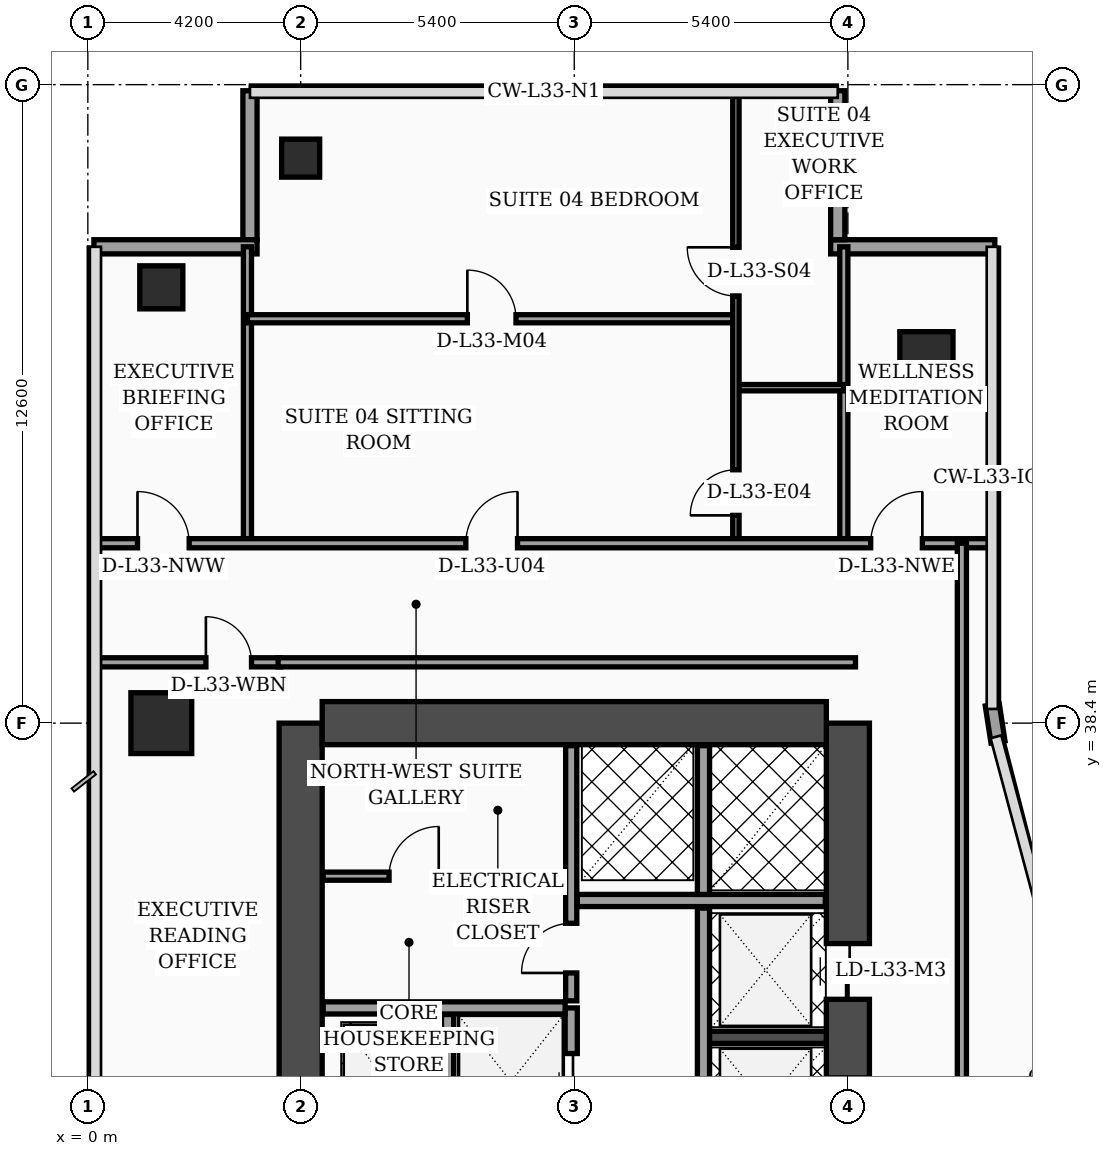
"""IFC4 building model, lengths in metres.
Left out: names, types, materials, properties, quantities, classifications, styles, units other than length and angle.
Written with IfcOpenShell. Run it as: python <this file> out.ifc"""

import sys

from ifc_helpers import new_model, si_unit, direction, frame, frame_2d, origin, origin_2d, place, context, subcontext, project, spatial, rectangle, hollow_rectangle, extrude, element, fill, save


model = new_model("IFC4")
c1 = context("Model", 3, precision=1e-05, world=origin(), true_north=direction((0.0, 1.0)))
c2 = subcontext(c1, "Body", "Model", "MODEL_VIEW")
j1 = project(units=[si_unit("LENGTHUNIT", "METRE"), si_unit("PLANEANGLEUNIT", "RADIAN")], contexts=[c1])
p1 = place(None, origin())
s1 = spatial("IfcSite", under=j1, at=p1, CompositionType="ELEMENT")
p2 = place(p1, origin())
s2 = spatial("IfcBuilding", under=s1, at=p2, CompositionType="ELEMENT")
p3 = place(p2, frame((0.0, 0.0, 135.4)))
s3 = spatial("IfcBuildingStorey", under=s2, at=p3, CompositionType="ELEMENT", Elevation=135.4)
p4 = place(p3, frame((4.2, 16.8, 0.0), z_axis=(0.0, 0.0, 1.0), x_axis=(0.0, 1.0, 0.0)))
e1 = element("IfcWall", 1, at=p4, inside=s3, PredefinedType="SHEAR", context=c2, shape_type="SweptSolid", body=[
    extrude(rectangle(XDim=21.6, YDim=0.85, at=frame_2d((10.8, 0.0))), origin(), (0.0, 0.0, 1.0), 3.52),
])
p5 = place(p3, frame((15.0, 16.8, 0.0), z_axis=(0.0, 0.0, 1.0), x_axis=(0.0, 1.0, 0.0)))
e2 = element("IfcWall", 2, at=p5, inside=s3, PredefinedType="SHEAR", context=c2, shape_type="SweptSolid", body=[
    extrude(rectangle(XDim=21.6, YDim=0.85, at=frame_2d((10.8, 0.0))), origin(), (0.0, 0.0, 1.0), 3.52),
])
p6 = place(p5, frame((8.65, 0.0, 0.0)))
e3 = element("IfcOpeningElement", 3, at=p6, cuts=e2, PredefinedType="OPENING", context=c2, shape_type="SweptSolid", body=[
    extrude(rectangle(XDim=1.1, YDim=2.2, at=frame_2d((0.55, 1.1))), frame((0.0, 0.435, 0.0), z_axis=(0.0, -1.0, 0.0), x_axis=(1.0, 0.0, 0.0)), (0.0, 0.0, 1.0), 0.87),
])
p7 = place(p5, frame((10.85, 0.0, 0.0)))
e4 = element("IfcOpeningElement", 4, at=p7, cuts=e2, PredefinedType="OPENING", context=c2, shape_type="SweptSolid", body=[
    extrude(rectangle(XDim=1.1, YDim=2.2, at=frame_2d((0.55, 1.1))), frame((0.0, 0.435, 0.0), z_axis=(0.0, -1.0, 0.0), x_axis=(1.0, 0.0, 0.0)), (0.0, 0.0, 1.0), 0.87),
])
p8 = place(p5, frame((13.5, 0.0, 0.0)))
e5 = element("IfcOpeningElement", 5, at=p8, cuts=e2, PredefinedType="OPENING", context=c2, shape_type="SweptSolid", body=[
    extrude(rectangle(XDim=1.1, YDim=2.2, at=frame_2d((0.55, 1.1))), frame((0.0, 0.435, 0.0), z_axis=(0.0, -1.0, 0.0), x_axis=(1.0, 0.0, 0.0)), (0.0, 0.0, 1.0), 0.87),
])
p9 = place(p5, frame((16.15, 0.0, 0.0)))
e6 = element("IfcOpeningElement", 6, at=p9, cuts=e2, PredefinedType="OPENING", context=c2, shape_type="SweptSolid", body=[
    extrude(rectangle(XDim=1.1, YDim=2.2, at=frame_2d((0.55, 1.1))), frame((0.0, 0.435, 0.0), z_axis=(0.0, -1.0, 0.0), x_axis=(1.0, 0.0, 0.0)), (0.0, 0.0, 1.0), 0.87),
])
p10 = place(p3, frame((4.625, 38.4, 0.0), z_axis=(0.0, 0.0, 1.0), x_axis=(1.0, 0.0, 0.0)))
e7 = element("IfcWall", 7, at=p10, inside=s3, PredefinedType="SHEAR", context=c2, shape_type="SweptSolid", body=[
    extrude(rectangle(XDim=9.95, YDim=0.85, at=frame_2d((4.975, 0.0))), origin(), (0.0, 0.0, 1.0), 3.52),
])
p11 = place(p3, frame((12.18, 32.2, 0.0), z_axis=(0.0, 0.0, 1.0), x_axis=(1.0, 0.0, 0.0)))
e8 = element("IfcWall", 8, at=p11, inside=s3, PredefinedType="SOLIDWALL", context=c2, shape_type="SweptSolid", body=[
    extrude(rectangle(XDim=2.395, YDim=0.24, at=frame_2d((1.198, 0.0))), origin(), (0.0, 0.0, 1.0), 3.52),
])
p12 = place(p3, frame((1.45, 38.4, 0.0), z_axis=(0.0, 0.0, 1.0), x_axis=(1.0, 0.0, 0.0)))
e9 = element("IfcColumn", 9, at=p12, inside=s3, PredefinedType="COLUMN", context=c2, shape_type="SweptSolid", body=[
    extrude(rectangle(XDim=1.2, YDim=1.2, at=origin_2d()), origin(), (0.0, 0.0, 1.0), 3.52),
])
p13 = place(p3, frame((1.45, 47.0, 0.0), z_axis=(0.0, 0.0, 1.0), x_axis=(1.0, 0.0, 0.0)))
e10 = element("IfcColumn", 10, at=p13, inside=s3, PredefinedType="COLUMN", context=c2, shape_type="SweptSolid", body=[
    extrude(hollow_rectangle(XDim=0.85, YDim=0.85, WallThickness=0.036, at=origin_2d()), origin(), (0.0, 0.0, 1.0), 3.52),
])
p14 = place(p3, frame((4.2, 49.55, 0.0), z_axis=(0.0, 0.0, 1.0), x_axis=(1.0, 0.0, 0.0)))
e11 = element("IfcColumn", 11, at=p14, inside=s3, PredefinedType="COLUMN", context=c2, shape_type="SweptSolid", body=[
    extrude(hollow_rectangle(XDim=0.75, YDim=0.75, WallThickness=0.032, at=origin_2d()), origin(), (0.0, 0.0, 1.0), 3.52),
])
p15 = place(p3, frame((16.55, 45.6, 0.0), z_axis=(0.0, 0.0, 1.0), x_axis=(1.0, 0.0, 0.0)))
e12 = element("IfcColumn", 12, at=p15, inside=s3, PredefinedType="COLUMN", context=c2, shape_type="SweptSolid", body=[
    extrude(rectangle(XDim=1.05, YDim=1.05, at=origin_2d()), origin(), (0.0, 0.0, 1.0), 3.52),
])
p16 = place(p3, frame((17.962, 38.03, 0.0), z_axis=(0.0, 0.0, 1.0), x_axis=(-0.15141125477, 0.988470855377, 0.0)))
e13 = element("IfcWall", 13, at=p16, inside=s3, PredefinedType="SOLIDWALL", context=c2, shape_type="SweptSolid", body=[
    extrude(rectangle(XDim=0.739, YDim=0.28, at=frame_2d((0.369, 0.0))), origin(), (0.0, 0.0, 1.0), 3.52),
])
p17 = place(p3, frame((17.9, 47.8, 0.0), z_axis=(0.0, 0.0, 1.0), x_axis=(-1.0, 0.0, 0.0)))
e14 = element("IfcWall", 14, at=p17, inside=s3, PredefinedType="SOLIDWALL", context=c2, shape_type="SweptSolid", body=[
    extrude(rectangle(XDim=3.24, YDim=0.28, at=frame_2d((1.62, 0.0))), origin(), (0.0, 0.0, 1.0), 3.52),
])
p18 = place(p3, frame((14.8, 47.94, 0.0), z_axis=(0.0, 0.0, 1.0), x_axis=(0.0, 1.0, 0.0)))
e15 = element("IfcWall", 15, at=p18, inside=s3, PredefinedType="SOLIDWALL", context=c2, shape_type="SweptSolid", body=[
    extrude(rectangle(XDim=2.94, YDim=0.28, at=frame_2d((1.47, 0.0))), origin(), (0.0, 0.0, 1.0), 3.52),
])
p19 = place(p3, frame((3.2, 50.88, 0.0), z_axis=(0.0, 0.0, 1.0), x_axis=(0.0, -1.0, 0.0)))
e16 = element("IfcWall", 16, at=p19, inside=s3, PredefinedType="SOLIDWALL", context=c2, shape_type="SweptSolid", body=[
    extrude(rectangle(XDim=2.94, YDim=0.28, at=frame_2d((1.47, 0.0))), origin(), (0.0, 0.0, 1.0), 3.02),
])
p20 = place(p3, frame((3.34, 47.8, 0.0), z_axis=(0.0, 0.0, 1.0), x_axis=(-1.0, 0.0, 0.0)))
e17 = element("IfcWall", 17, at=p20, inside=s3, PredefinedType="SOLIDWALL", context=c2, shape_type="SweptSolid", body=[
    extrude(rectangle(XDim=3.22, YDim=0.28, at=frame_2d((1.61, 0.0))), origin(), (0.0, 0.0, 1.0), 3.02),
])
p21 = place(p3, frame((7.1, 30.02, 0.0), z_axis=(0.0, 0.0, 1.0), x_axis=(0.0, 1.0, 0.0)))
e18 = element("IfcWall", 18, at=p21, inside=s3, PredefinedType="SOLIDWALL", context=c2, shape_type="SweptSolid", body=[
    extrude(rectangle(XDim=2.63, YDim=0.24, at=frame_2d((1.315, 0.0))), origin(), (0.0, 0.0, 1.0), 3.52),
])
p22 = place(p3, frame((9.54, 29.88, 0.0), z_axis=(0.0, 0.0, 1.0), x_axis=(0.0, 1.0, 0.0)))
e19 = element("IfcWall", 19, at=p22, inside=s3, PredefinedType="SOLIDWALL", context=c2, shape_type="SweptSolid", body=[
    extrude(rectangle(XDim=2.9, YDim=0.24, at=frame_2d((1.45, 0.0))), origin(), (0.0, 0.0, 1.0), 3.52),
])
p23 = place(p22, frame((0.7, 0.0, 0.0)))
e20 = element("IfcOpeningElement", 20, at=p23, cuts=e19, PredefinedType="OPENING", context=c2, shape_type="SweptSolid", body=[
    extrude(rectangle(XDim=1.3, YDim=2.35, at=frame_2d((0.65, 1.175))), frame((0.0, 0.13, 0.0), z_axis=(0.0, -1.0, 0.0), x_axis=(1.0, 0.0, 0.0)), (0.0, 0.0, 1.0), 0.26),
])
p24 = place(p3, frame((4.645, 32.78, 0.0), z_axis=(0.0, 0.0, 1.0), x_axis=(1.0, 0.0, 0.0)))
e21 = element("IfcWall", 21, at=p24, inside=s3, PredefinedType="SOLIDWALL", context=c2, shape_type="SweptSolid", body=[
    extrude(rectangle(XDim=4.775, YDim=0.24, at=frame_2d((2.387, 0.0))), origin(), (0.0, 0.0, 1.0), 3.17),
])
p25 = place(p3, frame((4.645, 35.38, 0.0), z_axis=(0.0, 0.0, 1.0), x_axis=(1.0, 0.0, 0.0)))
e22 = element("IfcWall", 22, at=p25, inside=s3, PredefinedType="PARTITIONING", context=c2, shape_type="SweptSolid", body=[
    extrude(rectangle(XDim=4.775, YDim=0.16, at=frame_2d((2.387, 0.0))), origin(), (0.0, 0.0, 1.0), 3.52),
])
p26 = place(p25, frame((1.3, 0.0, 0.0)))
e23 = element("IfcOpeningElement", 23, at=p26, cuts=e22, PredefinedType="OPENING", context=c2, shape_type="SweptSolid", body=[
    extrude(rectangle(XDim=0.98, YDim=2.15, at=frame_2d((0.49, 1.075))), frame((0.0, 0.09, 0.0), z_axis=(0.0, -1.0, 0.0), x_axis=(1.0, 0.0, 0.0)), (0.0, 0.0, 1.0), 0.18),
])
p27 = place(p3, frame((9.54, 32.92, 0.0), z_axis=(0.0, 0.0, 1.0), x_axis=(0.0, 1.0, 0.0)))
e24 = element("IfcWall", 24, at=p27, inside=s3, PredefinedType="SOLIDWALL", context=c2, shape_type="SweptSolid", body=[
    extrude(rectangle(XDim=5.035, YDim=0.22, at=frame_2d((2.518, 0.0))), origin(), (0.0, 0.0, 1.0), 3.52),
])
p28 = place(p27, frame((0.55, 0.0, 0.0)))
e25 = element("IfcOpeningElement", 25, at=p28, cuts=e24, PredefinedType="OPENING", context=c2, shape_type="SweptSolid", body=[
    extrude(rectangle(XDim=0.98, YDim=2.15, at=frame_2d((0.49, 1.075))), frame((0.0, 0.12, 0.0), z_axis=(0.0, -1.0, 0.0), x_axis=(1.0, 0.0, 0.0)), (0.0, 0.0, 1.0), 0.24),
])
p29 = place(p3, frame((12.15, 27.0, 0.0), z_axis=(0.0, 0.0, 1.0), x_axis=(0.0, 1.0, 0.0)))
e26 = element("IfcWall", 26, at=p29, inside=s3, PredefinedType="SOLIDWALL", context=c2, shape_type="SweptSolid", body=[
    extrude(rectangle(XDim=7.75, YDim=0.24, at=frame_2d((3.875, 0.0))), origin(), (0.0, 0.0, 1.0), 3.52),
])
p30 = place(p3, frame((9.66, 34.9, 0.0), z_axis=(0.0, 0.0, 1.0), x_axis=(1.0, 0.0, 0.0)))
e27 = element("IfcWall", 27, at=p30, inside=s3, PredefinedType="SOLIDWALL", context=c2, shape_type="SweptSolid", body=[
    extrude(rectangle(XDim=4.895, YDim=0.24, at=frame_2d((2.448, 0.0))), origin(), (0.0, 0.0, 1.0), 3.52),
])
p31 = place(p3, frame((12.15, 35.02, 0.0), z_axis=(0.0, 0.0, 1.0), x_axis=(0.0, 1.0, 0.0)))
e28 = element("IfcWall", 28, at=p31, inside=s3, PredefinedType="SOLIDWALL", context=c2, shape_type="SweptSolid", body=[
    extrude(rectangle(XDim=2.935, YDim=0.24, at=frame_2d((1.468, 0.0))), origin(), (0.0, 0.0, 1.0), 3.52),
])
p32 = place(p3, frame((0.08, 39.6, 0.0), z_axis=(0.0, 0.0, 1.0), x_axis=(1.0, 0.0, 0.0)))
e29 = element("IfcWall", 29, at=p32, inside=s3, PredefinedType="PARTITIONING", context=c2, shape_type="SweptSolid", body=[
    extrude(rectangle(XDim=3.725, YDim=0.18, at=frame_2d((1.862, 0.0))), origin(), (0.0, 0.0, 1.0), 2.82),
])
p33 = place(p32, frame((2.25, 0.0, 0.0)))
e30 = element("IfcOpeningElement", 30, at=p33, cuts=e29, PredefinedType="OPENING", context=c2, shape_type="SweptSolid", body=[
    extrude(rectangle(XDim=0.9, YDim=2.15, at=frame_2d((0.45, 1.075))), frame((0.0, 0.1, 0.0), z_axis=(0.0, -1.0, 0.0), x_axis=(1.0, 0.0, 0.0)), (0.0, 0.0, 1.0), 0.2),
])
p34 = place(p3, frame((3.15, 41.95, 0.0), z_axis=(0.0, 0.0, 1.0), x_axis=(0.0, 1.0, 0.0)))
e31 = element("IfcWall", 31, at=p34, inside=s3, PredefinedType="PARTITIONING", context=c2, shape_type="SweptSolid", body=[
    extrude(rectangle(XDim=5.85, YDim=0.16, at=frame_2d((2.925, 0.0))), origin(), (0.0, 0.0, 1.0), 3.12),
])
p35 = place(p3, frame((14.92, 41.95, 0.0), z_axis=(0.0, 0.0, 1.0), x_axis=(0.0, 1.0, 0.0)))
e32 = element("IfcWall", 32, at=p35, inside=s3, PredefinedType="PARTITIONING", context=c2, shape_type="SweptSolid", body=[
    extrude(rectangle(XDim=5.85, YDim=0.16, at=frame_2d((2.925, 0.0))), origin(), (0.0, 0.0, 1.0), 3.02),
])
p36 = place(p3, frame((12.79, 45.02, 0.0), z_axis=(0.0, 0.0, 1.0), x_axis=(1.0, 0.0, 0.0)))
e33 = element("IfcWall", 33, at=p36, inside=s3, PredefinedType="PARTITIONING", context=c2, shape_type="SweptSolid", body=[
    extrude(rectangle(XDim=2.13, YDim=0.125, at=frame_2d((1.065, 0.0))), origin(), (0.0, 0.0, 1.0), 3.52),
])
p37 = place(p3, frame((3.15, 46.38, 0.0), z_axis=(0.0, 0.0, 1.0), x_axis=(1.0, 0.0, 0.0)))
e34 = element("IfcWall", 34, at=p37, inside=s3, PredefinedType="PARTITIONING", context=c2, shape_type="SweptSolid", body=[
    extrude(rectangle(XDim=9.64, YDim=0.16, at=frame_2d((4.82, 0.0))), origin(), (0.0, 0.0, 1.0), 2.82),
])
p38 = place(p37, frame((4.34, 0.0, 0.0)))
e35 = element("IfcOpeningElement", 35, at=p38, cuts=e34, PredefinedType="OPENING", context=c2, shape_type="SweptSolid", body=[
    extrude(rectangle(XDim=0.96, YDim=2.2, at=frame_2d((0.48, 1.1))), frame((0.0, 0.09, 0.0), z_axis=(0.0, -1.0, 0.0), x_axis=(1.0, 0.0, 0.0)), (0.0, 0.0, 1.0), 0.18),
])
p39 = place(p3, frame((12.79, 41.95, 0.0), z_axis=(0.0, 0.0, 1.0), x_axis=(0.0, 1.0, 0.0)))
e36 = element("IfcWall", 36, at=p39, inside=s3, PredefinedType="PARTITIONING", context=c2, shape_type="SweptSolid", body=[
    extrude(rectangle(XDim=8.99, YDim=0.125, at=frame_2d((4.495, 0.0))), origin(), (0.0, 0.0, 1.0), 3.02),
])
p40 = place(p39, frame((0.55, 0.0, 0.0)))
e37 = element("IfcOpeningElement", 37, at=p40, cuts=e36, PredefinedType="OPENING", context=c2, shape_type="SweptSolid", body=[
    extrude(rectangle(XDim=0.9, YDim=2.15, at=frame_2d((0.45, 1.075))), frame((0.0, 0.073, 0.0), z_axis=(0.0, -1.0, 0.0), x_axis=(1.0, 0.0, 0.0)), (0.0, 0.0, 1.0), 0.145),
])
p41 = place(p39, frame((4.88, 0.0, 0.0)))
e38 = element("IfcOpeningElement", 38, at=p41, cuts=e36, PredefinedType="OPENING", context=c2, shape_type="SweptSolid", body=[
    extrude(rectangle(XDim=0.96, YDim=2.2, at=frame_2d((0.48, 1.1))), frame((0.0, 0.073, 0.0), z_axis=(0.0, -1.0, 0.0), x_axis=(1.0, 0.0, 0.0)), (0.0, 0.0, 1.0), 0.145),
])
p42 = place(p3, frame((0.08, 41.95, 0.0), z_axis=(0.0, 0.0, 1.0), x_axis=(1.0, 0.0, 0.0)))
e39 = element("IfcWall", 39, at=p42, inside=s3, PredefinedType="PARTITIONING", context=c2, shape_type="SweptSolid", body=[
    extrude(rectangle(XDim=17.77, YDim=0.18, at=frame_2d((8.885, 0.0))), origin(), (0.0, 0.0, 1.0), 2.82),
])
p43 = place(p42, frame((0.9, 0.0, 0.0)))
e40 = element("IfcOpeningElement", 40, at=p43, cuts=e39, PredefinedType="OPENING", context=c2, shape_type="SweptSolid", body=[
    extrude(rectangle(XDim=1.02, YDim=2.2, at=frame_2d((0.51, 1.1))), frame((0.0, 0.1, 0.0), z_axis=(0.0, -1.0, 0.0), x_axis=(1.0, 0.0, 0.0)), (0.0, 0.0, 1.0), 0.2),
])
p44 = place(p42, frame((7.38, 0.0, 0.0)))
e41 = element("IfcOpeningElement", 41, at=p44, cuts=e39, PredefinedType="OPENING", context=c2, shape_type="SweptSolid", body=[
    extrude(rectangle(XDim=1.02, YDim=2.2, at=frame_2d((0.51, 1.1))), frame((0.0, 0.1, 0.0), z_axis=(0.0, -1.0, 0.0), x_axis=(1.0, 0.0, 0.0)), (0.0, 0.0, 1.0), 0.2),
])
p45 = place(p42, frame((15.37, 0.0, 0.0)))
e42 = element("IfcOpeningElement", 42, at=p45, cuts=e39, PredefinedType="OPENING", context=c2, shape_type="SweptSolid", body=[
    extrude(rectangle(XDim=1.02, YDim=2.2, at=frame_2d((0.51, 1.1))), frame((0.0, 0.1, 0.0), z_axis=(0.0, -1.0, 0.0), x_axis=(1.0, 0.0, 0.0)), (0.0, 0.0, 1.0), 0.2),
])
p46 = place(p3, frame((17.25, 24.3, 0.0), z_axis=(0.0, 0.0, 1.0), x_axis=(0.0, 1.0, 0.0)))
e43 = element("IfcWall", 43, at=p46, inside=s3, PredefinedType="PARTITIONING", context=c2, shape_type="SweptSolid", body=[
    extrude(rectangle(XDim=17.65, YDim=0.18, at=frame_2d((8.825, 0.0))), origin(), (0.0, 0.0, 1.0), 2.82),
])
p47 = place(p3, frame((3.755, 39.6, 0.0), z_axis=(0.0, 0.0, 1.0), x_axis=(1.0, 0.0, 0.0)))
e44 = element("IfcWall", 44, at=p47, inside=s3, PredefinedType="PARTITIONING", context=c2, shape_type="SweptSolid", body=[
    extrude(rectangle(XDim=11.395, YDim=0.18, at=frame_2d((5.698, 0.0))), origin(), (0.0, 0.0, 1.0), 2.82),
])
p48 = place(p23, origin())
e45 = element("IfcDoor", 45, at=p48, inside=s3, OperationType="DOUBLE_DOOR_SLIDING", PredefinedType="DOOR", context=c2, shape_type="SweptSolid", body=[
    extrude(rectangle(XDim=1.3, YDim=2.35, at=frame_2d((0.65, 1.175))), frame((0.0, 0.025, 0.0), z_axis=(0.0, -1.0, 0.0), x_axis=(1.0, 0.0, 0.0)), (0.0, 0.0, 1.0), 0.05),
])
fill(e20, e45)
p49 = place(p26, origin())
e46 = element("IfcDoor", 46, at=p49, inside=s3, OperationType="SINGLE_SWING_RIGHT", PredefinedType="DOOR", context=c2, shape_type="SweptSolid", body=[
    extrude(rectangle(XDim=0.98, YDim=2.15, at=frame_2d((0.49, 1.075))), frame((0.0, 0.025, 0.0), z_axis=(0.0, -1.0, 0.0), x_axis=(1.0, 0.0, 0.0)), (0.0, 0.0, 1.0), 0.05),
])
fill(e23, e46)
p50 = place(p28, origin())
e47 = element("IfcDoor", 47, at=p50, inside=s3, OperationType="SINGLE_SWING_LEFT", PredefinedType="DOOR", context=c2, shape_type="SweptSolid", body=[
    extrude(rectangle(XDim=0.98, YDim=2.15, at=frame_2d((0.49, 1.075))), frame((0.0, 0.025, 0.0), z_axis=(0.0, -1.0, 0.0), x_axis=(1.0, 0.0, 0.0)), (0.0, 0.0, 1.0), 0.05),
])
fill(e25, e47)
p51 = place(p33, origin())
e48 = element("IfcDoor", 48, at=p51, inside=s3, OperationType="SINGLE_SWING_LEFT", PredefinedType="DOOR", context=c2, shape_type="SweptSolid", body=[
    extrude(rectangle(XDim=0.9, YDim=2.15, at=frame_2d((0.45, 1.075))), frame((0.0, 0.025, 0.0), z_axis=(0.0, -1.0, 0.0), x_axis=(1.0, 0.0, 0.0)), (0.0, 0.0, 1.0), 0.05),
])
fill(e30, e48)
p52 = place(p38, origin())
e49 = element("IfcDoor", 49, at=p52, inside=s3, OperationType="SINGLE_SWING_LEFT", PredefinedType="DOOR", context=c2, shape_type="SweptSolid", body=[
    extrude(rectangle(XDim=0.96, YDim=2.2, at=frame_2d((0.48, 1.1))), frame((0.0, 0.025, 0.0), z_axis=(0.0, -1.0, 0.0), x_axis=(1.0, 0.0, 0.0)), (0.0, 0.0, 1.0), 0.05),
])
fill(e35, e49)
p53 = place(p40, origin())
e50 = element("IfcDoor", 50, at=p53, inside=s3, OperationType="SINGLE_SWING_LEFT", PredefinedType="DOOR", context=c2, shape_type="SweptSolid", body=[
    extrude(rectangle(XDim=0.9, YDim=2.15, at=frame_2d((0.45, 1.075))), frame((0.0, 0.025, 0.0), z_axis=(0.0, -1.0, 0.0), x_axis=(1.0, 0.0, 0.0)), (0.0, 0.0, 1.0), 0.05),
])
fill(e37, e50)
p54 = place(p41, origin())
e51 = element("IfcDoor", 51, at=p54, inside=s3, OperationType="SINGLE_SWING_RIGHT", PredefinedType="DOOR", context=c2, shape_type="SweptSolid", body=[
    extrude(rectangle(XDim=0.96, YDim=2.2, at=frame_2d((0.48, 1.1))), frame((0.0, 0.025, 0.0), z_axis=(0.0, -1.0, 0.0), x_axis=(1.0, 0.0, 0.0)), (0.0, 0.0, 1.0), 0.05),
])
fill(e38, e51)
p55 = place(p43, origin())
e52 = element("IfcDoor", 52, at=p55, inside=s3, OperationType="SINGLE_SWING_LEFT", PredefinedType="DOOR", context=c2, shape_type="SweptSolid", body=[
    extrude(rectangle(XDim=1.02, YDim=2.2, at=frame_2d((0.51, 1.1))), frame((0.0, 0.025, 0.0), z_axis=(0.0, -1.0, 0.0), x_axis=(1.0, 0.0, 0.0)), (0.0, 0.0, 1.0), 0.05),
])
fill(e40, e52)
p56 = place(p44, origin())
e53 = element("IfcDoor", 53, at=p56, inside=s3, OperationType="SINGLE_SWING_RIGHT", PredefinedType="DOOR", context=c2, shape_type="SweptSolid", body=[
    extrude(rectangle(XDim=1.02, YDim=2.2, at=frame_2d((0.51, 1.1))), frame((0.0, 0.025, 0.0), z_axis=(0.0, -1.0, 0.0), x_axis=(1.0, 0.0, 0.0)), (0.0, 0.0, 1.0), 0.05),
])
fill(e41, e53)
p57 = place(p45, origin())
e54 = element("IfcDoor", 54, at=p57, inside=s3, OperationType="SINGLE_SWING_RIGHT", PredefinedType="DOOR", context=c2, shape_type="SweptSolid", body=[
    extrude(rectangle(XDim=1.02, YDim=2.2, at=frame_2d((0.51, 1.1))), frame((0.0, 0.025, 0.0), z_axis=(0.0, -1.0, 0.0), x_axis=(1.0, 0.0, 0.0)), (0.0, 0.0, 1.0), 0.05),
])
fill(e42, e54)
p58 = place(p9, origin())
e55 = element("IfcDoor", 55, at=p58, inside=s3, OperationType="DOUBLE_DOOR_SLIDING", PredefinedType="DOOR", context=c2, shape_type="SweptSolid", body=[
    extrude(rectangle(XDim=1.1, YDim=2.2, at=frame_2d((0.55, 1.1))), frame((0.0, 0.025, 0.0), z_axis=(0.0, -1.0, 0.0), x_axis=(1.0, 0.0, 0.0)), (0.0, 0.0, 1.0), 0.05),
])
fill(e6, e55)
save(model, sys.argv[1])
